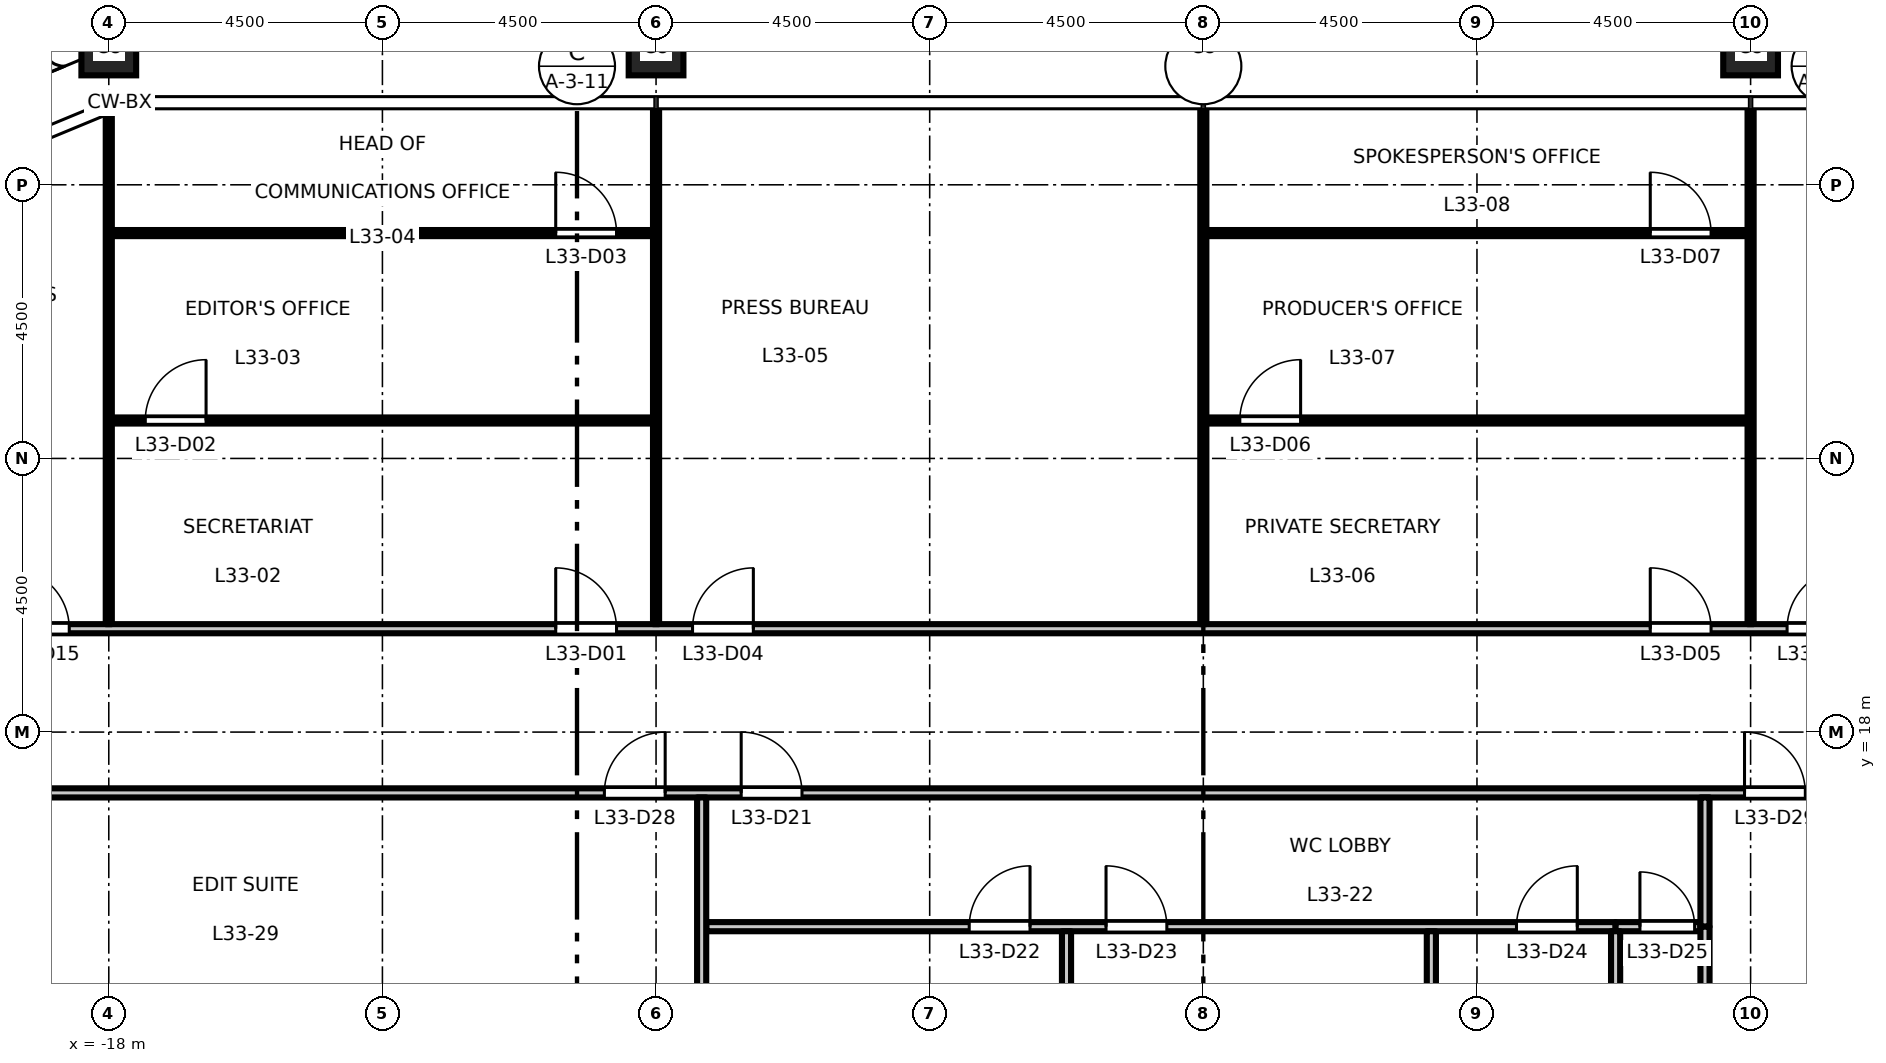
"""IFC4 building model, lengths in metres.
Left out: names, types, materials, properties, quantities, classifications, styles, units other than length and angle.
Written with IfcOpenShell. Run it as: python <this file> out.ifc"""

import sys

from ifc_helpers import new_model, si_unit, direction, frame, frame_2d, origin, origin_2d, place, context, subcontext, project, spatial, rectangle, hollow_rectangle, extrude, element, fill, save


model = new_model("IFC4")
c1 = context("Model", 3, precision=1e-05, world=origin(), true_north=direction((0.0, 1.0)))
c2 = subcontext(c1, "Body", "Model", "MODEL_VIEW")
j1 = project(units=[si_unit("LENGTHUNIT", "METRE"), si_unit("PLANEANGLEUNIT", "RADIAN")], contexts=[c1])
p1 = place(None, origin())
s1 = spatial("IfcSite", under=j1, at=p1, CompositionType="ELEMENT")
p2 = place(p1, origin())
s2 = spatial("IfcBuilding", under=s1, at=p2, CompositionType="ELEMENT")
p3 = place(p2, frame((0.0, 0.0, 154.2)))
s3 = spatial("IfcBuildingStorey", under=s2, at=p3, CompositionType="ELEMENT", Elevation=154.2)
for number, where, z_axis, x_axis in (
    (1, (9.0, 29.25, 0.0), (0.0, 0.0, 1.0), (1.0, 0.0, 0.0)),
    (2, (0.0, 29.25, 0.0), (0.0, 0.0, 1.0), (1.0, 0.0, 0.0)),
    (3, (-9.0, 29.25, 0.0), (0.0, 0.0, 1.0), (1.0, 0.0, 0.0)),
    (4, (-18.0, 29.25, 0.0), (0.0, 0.0, 1.0), (1.0, 0.0, 0.0)),
):
    element("IfcColumn", number, at=place(p3, frame(where, z_axis=z_axis, x_axis=x_axis)), inside=s3, PredefinedType="COLUMN", context=c2, shape_type="SweptSolid", body=[
        extrude(hollow_rectangle(XDim=0.9, YDim=0.9, WallThickness=0.05, at=origin_2d()), origin(), (0.0, 0.0, 1.0), 4.5),
    ])
p4 = place(p3, frame((-8.175, 14.8, 0.0), z_axis=(0.0, 0.0, 1.0), x_axis=(1.0, 0.0, 0.0)))
e5 = element("IfcWall", 5, at=p4, inside=s3, PredefinedType="PARTITIONING", context=c2, shape_type="SweptSolid", body=[
    extrude(rectangle(XDim=14.955, YDim=0.15, at=frame_2d((7.478, 0.0))), origin(), (0.0, 0.0, 1.0), 4.35),
])
p5 = place(p4, frame((4.325, 0.0, 0.0)))
e6 = element("IfcOpeningElement", 6, at=p5, cuts=e5, PredefinedType="OPENING", context=c2, shape_type="SweptSolid", body=[
    extrude(rectangle(XDim=1.0, YDim=2.1, at=frame_2d((0.5, 1.05))), frame((0.0, 0.085, 0.0), z_axis=(0.0, -1.0, 0.0), x_axis=(1.0, 0.0, 0.0)), (0.0, 0.0, 1.0), 0.17),
])
p6 = place(p4, frame((6.575, 0.0, 0.0)))
e7 = element("IfcOpeningElement", 7, at=p6, cuts=e5, PredefinedType="OPENING", context=c2, shape_type="SweptSolid", body=[
    extrude(rectangle(XDim=1.0, YDim=2.1, at=frame_2d((0.5, 1.05))), frame((0.0, 0.085, 0.0), z_axis=(0.0, -1.0, 0.0), x_axis=(1.0, 0.0, 0.0)), (0.0, 0.0, 1.0), 0.17),
])
p7 = place(p4, frame((13.325, 0.0, 0.0)))
e8 = element("IfcOpeningElement", 8, at=p7, cuts=e5, PredefinedType="OPENING", context=c2, shape_type="SweptSolid", body=[
    extrude(rectangle(XDim=1.0, YDim=2.1, at=frame_2d((0.5, 1.05))), frame((0.0, 0.085, 0.0), z_axis=(0.0, -1.0, 0.0), x_axis=(1.0, 0.0, 0.0)), (0.0, 0.0, 1.0), 0.17),
])
p8 = place(p3, frame((6.78, 14.8, 0.0), z_axis=(0.0, 0.0, 1.0), x_axis=(1.0, 0.0, 0.0)))
e9 = element("IfcWall", 9, at=p8, inside=s3, PredefinedType="PARTITIONING", context=c2, shape_type="SweptSolid", body=[
    extrude(rectangle(XDim=1.395, YDim=0.15, at=frame_2d((0.698, 0.0))), origin(), (0.0, 0.0, 1.0), 4.35),
])
p9 = place(p8, frame((0.4, 0.0, 0.0)))
e10 = element("IfcOpeningElement", 10, at=p9, cuts=e9, PredefinedType="OPENING", context=c2, shape_type="SweptSolid", body=[
    extrude(rectangle(XDim=0.9, YDim=2.1, at=frame_2d((0.45, 1.05))), frame((0.0, 0.085, 0.0), z_axis=(0.0, -1.0, 0.0), x_axis=(1.0, 0.0, 0.0)), (0.0, 0.0, 1.0), 0.17),
])
p10 = place(p3, frame((-21.825, 17.0, 0.0), z_axis=(0.0, 0.0, 1.0), x_axis=(1.0, 0.0, 0.0)))
e11 = element("IfcWall", 11, at=p10, inside=s3, PredefinedType="PARTITIONING", context=c2, shape_type="SweptSolid", body=[
    extrude(rectangle(XDim=43.65, YDim=0.15, at=frame_2d((21.825, 0.0))), origin(), (0.0, 0.0, 1.0), 4.35),
])
p11 = place(p10, frame((14.225, 0.0, 0.0)))
e12 = element("IfcOpeningElement", 12, at=p11, cuts=e11, PredefinedType="OPENING", context=c2, shape_type="SweptSolid", body=[
    extrude(rectangle(XDim=1.0, YDim=2.1, at=frame_2d((0.5, 1.05))), frame((0.0, 0.085, 0.0), z_axis=(0.0, -1.0, 0.0), x_axis=(1.0, 0.0, 0.0)), (0.0, 0.0, 1.0), 0.17),
])
p12 = place(p10, frame((11.975, 0.0, 0.0)))
e13 = element("IfcOpeningElement", 13, at=p12, cuts=e11, PredefinedType="OPENING", context=c2, shape_type="SweptSolid", body=[
    extrude(rectangle(XDim=1.0, YDim=2.1, at=frame_2d((0.5, 1.05))), frame((0.0, 0.085, 0.0), z_axis=(0.0, -1.0, 0.0), x_axis=(1.0, 0.0, 0.0)), (0.0, 0.0, 1.0), 0.17),
])
p13 = place(p10, frame((30.725, 0.0, 0.0)))
e14 = element("IfcOpeningElement", 14, at=p13, cuts=e11, PredefinedType="OPENING", context=c2, shape_type="SweptSolid", body=[
    extrude(rectangle(XDim=1.0, YDim=2.1, at=frame_2d((0.5, 1.05))), frame((0.0, 0.085, 0.0), z_axis=(0.0, -1.0, 0.0), x_axis=(1.0, 0.0, 0.0)), (0.0, 0.0, 1.0), 0.17),
])
p14 = place(p3, frame((-27.474, 19.7, 0.0), z_axis=(0.0, 0.0, 1.0), x_axis=(1.0, 0.0, 0.0)))
e15 = element("IfcWall", 15, at=p14, inside=s3, PredefinedType="PARTITIONING", context=c2, shape_type="SweptSolid", body=[
    extrude(rectangle(XDim=54.948, YDim=0.15, at=frame_2d((27.474, 0.0))), origin(), (0.0, 0.0, 1.0), 4.35),
])
p15 = place(p14, frame((16.824, 0.0, 0.0)))
e16 = element("IfcOpeningElement", 16, at=p15, cuts=e15, PredefinedType="OPENING", context=c2, shape_type="SweptSolid", body=[
    extrude(rectangle(XDim=1.0, YDim=2.1, at=frame_2d((0.5, 1.05))), frame((0.0, 0.085, 0.0), z_axis=(0.0, -1.0, 0.0), x_axis=(1.0, 0.0, 0.0)), (0.0, 0.0, 1.0), 0.17),
])
p16 = place(p14, frame((19.074, 0.0, 0.0)))
e17 = element("IfcOpeningElement", 17, at=p16, cuts=e15, PredefinedType="OPENING", context=c2, shape_type="SweptSolid", body=[
    extrude(rectangle(XDim=1.0, YDim=2.1, at=frame_2d((0.5, 1.05))), frame((0.0, 0.085, 0.0), z_axis=(0.0, -1.0, 0.0), x_axis=(1.0, 0.0, 0.0)), (0.0, 0.0, 1.0), 0.17),
])
p17 = place(p14, frame((34.824, 0.0, 0.0)))
e18 = element("IfcOpeningElement", 18, at=p17, cuts=e15, PredefinedType="OPENING", context=c2, shape_type="SweptSolid", body=[
    extrude(rectangle(XDim=1.0, YDim=2.1, at=frame_2d((0.5, 1.05))), frame((0.0, 0.085, 0.0), z_axis=(0.0, -1.0, 0.0), x_axis=(1.0, 0.0, 0.0)), (0.0, 0.0, 1.0), 0.17),
])
p18 = place(p14, frame((37.074, 0.0, 0.0)))
e19 = element("IfcOpeningElement", 19, at=p18, cuts=e15, PredefinedType="OPENING", context=c2, shape_type="SweptSolid", body=[
    extrude(rectangle(XDim=1.0, YDim=2.1, at=frame_2d((0.5, 1.05))), frame((0.0, 0.085, 0.0), z_axis=(0.0, -1.0, 0.0), x_axis=(1.0, 0.0, 0.0)), (0.0, 0.0, 1.0), 0.17),
])
p19 = place(p14, frame((7.824, 0.0, 0.0)))
e20 = element("IfcOpeningElement", 20, at=p19, cuts=e15, PredefinedType="OPENING", context=c2, shape_type="SweptSolid", body=[
    extrude(rectangle(XDim=1.0, YDim=2.1, at=frame_2d((0.5, 1.05))), frame((0.0, 0.085, 0.0), z_axis=(0.0, -1.0, 0.0), x_axis=(1.0, 0.0, 0.0)), (0.0, 0.0, 1.0), 0.17),
])
p20 = place(p14, frame((46.048, 0.0, 0.0)))
e21 = element("IfcOpeningElement", 21, at=p20, cuts=e15, PredefinedType="OPENING", context=c2, shape_type="SweptSolid", body=[
    extrude(rectangle(XDim=1.0, YDim=2.1, at=frame_2d((0.5, 1.05))), frame((0.0, 0.085, 0.0), z_axis=(0.0, -1.0, 0.0), x_axis=(1.0, 0.0, 0.0)), (0.0, 0.0, 1.0), 0.17),
])
p21 = place(p3, frame((-17.95, 23.124, 0.0), z_axis=(0.0, 0.0, 1.0), x_axis=(1.0, 0.0, 0.0)))
e22 = element("IfcWall", 22, at=p21, inside=s3, PredefinedType="PARTITIONING", context=c2, shape_type="SweptSolid", body=[
    extrude(rectangle(XDim=8.9, YDim=0.1, at=frame_2d((4.45, 0.0))), origin(), (0.0, 0.0, 1.0), 4.35),
])
p22 = place(p21, frame((0.55, 0.0, 0.0)))
e23 = element("IfcOpeningElement", 23, at=p22, cuts=e22, PredefinedType="OPENING", context=c2, shape_type="SweptSolid", body=[
    extrude(rectangle(XDim=1.0, YDim=2.1, at=frame_2d((0.5, 1.05))), frame((0.0, 0.06, 0.0), z_axis=(0.0, -1.0, 0.0), x_axis=(1.0, 0.0, 0.0)), (0.0, 0.0, 1.0), 0.12),
])
p23 = place(p3, frame((0.05, 23.124, 0.0), z_axis=(0.0, 0.0, 1.0), x_axis=(1.0, 0.0, 0.0)))
e24 = element("IfcWall", 24, at=p23, inside=s3, PredefinedType="PARTITIONING", context=c2, shape_type="SweptSolid", body=[
    extrude(rectangle(XDim=8.9, YDim=0.1, at=frame_2d((4.45, 0.0))), origin(), (0.0, 0.0, 1.0), 4.35),
])
p24 = place(p23, frame((0.55, 0.0, 0.0)))
e25 = element("IfcOpeningElement", 25, at=p24, cuts=e24, PredefinedType="OPENING", context=c2, shape_type="SweptSolid", body=[
    extrude(rectangle(XDim=1.0, YDim=2.1, at=frame_2d((0.5, 1.05))), frame((0.0, 0.06, 0.0), z_axis=(0.0, -1.0, 0.0), x_axis=(1.0, 0.0, 0.0)), (0.0, 0.0, 1.0), 0.12),
])
p25 = place(p3, frame((-17.95, 26.206, 0.0), z_axis=(0.0, 0.0, 1.0), x_axis=(1.0, 0.0, 0.0)))
e26 = element("IfcWall", 26, at=p25, inside=s3, PredefinedType="PARTITIONING", context=c2, shape_type="SweptSolid", body=[
    extrude(rectangle(XDim=8.9, YDim=0.1, at=frame_2d((4.45, 0.0))), origin(), (0.0, 0.0, 1.0), 4.35),
])
p26 = place(p25, frame((7.3, 0.0, 0.0)))
e27 = element("IfcOpeningElement", 27, at=p26, cuts=e26, PredefinedType="OPENING", context=c2, shape_type="SweptSolid", body=[
    extrude(rectangle(XDim=1.0, YDim=2.1, at=frame_2d((0.5, 1.05))), frame((0.0, 0.06, 0.0), z_axis=(0.0, -1.0, 0.0), x_axis=(1.0, 0.0, 0.0)), (0.0, 0.0, 1.0), 0.12),
])
p27 = place(p3, frame((0.05, 26.206, 0.0), z_axis=(0.0, 0.0, 1.0), x_axis=(1.0, 0.0, 0.0)))
e28 = element("IfcWall", 28, at=p27, inside=s3, PredefinedType="PARTITIONING", context=c2, shape_type="SweptSolid", body=[
    extrude(rectangle(XDim=8.9, YDim=0.1, at=frame_2d((4.45, 0.0))), origin(), (0.0, 0.0, 1.0), 4.35),
])
p28 = place(p27, frame((7.3, 0.0, 0.0)))
e29 = element("IfcOpeningElement", 29, at=p28, cuts=e28, PredefinedType="OPENING", context=c2, shape_type="SweptSolid", body=[
    extrude(rectangle(XDim=1.0, YDim=2.1, at=frame_2d((0.5, 1.05))), frame((0.0, 0.06, 0.0), z_axis=(0.0, -1.0, 0.0), x_axis=(1.0, 0.0, 0.0)), (0.0, 0.0, 1.0), 0.12),
])
p29 = place(p3, frame((-18.0, 19.775, 0.0), z_axis=(0.0, 0.0, 1.0), x_axis=(0.0, 1.0, 0.0)))
e30 = element("IfcWall", 30, at=p29, inside=s3, PredefinedType="PARTITIONING", context=c2, shape_type="SweptSolid", body=[
    extrude(rectangle(XDim=8.403, YDim=0.1, at=frame_2d((4.202, 0.0))), origin(), (0.0, 0.0, 1.0), 3.45),
])
p30 = place(p3, frame((-9.0, 19.775, 0.0), z_axis=(0.0, 0.0, 1.0), x_axis=(0.0, 1.0, 0.0)))
e31 = element("IfcWall", 31, at=p30, inside=s3, PredefinedType="PARTITIONING", context=c2, shape_type="SweptSolid", body=[
    extrude(rectangle(XDim=8.485, YDim=0.1, at=frame_2d((4.243, 0.0))), origin(), (0.0, 0.0, 1.0), 3.45),
])
p31 = place(p3, frame((-8.25, 13.5, 0.0), z_axis=(0.0, 0.0, 1.0), x_axis=(0.0, 1.0, 0.0)))
e32 = element("IfcWall", 32, at=p31, inside=s3, PredefinedType="PARTITIONING", context=c2, shape_type="SweptSolid", body=[
    extrude(rectangle(XDim=3.425, YDim=0.15, at=frame_2d((1.712, 0.0))), origin(), (0.0, 0.0, 1.0), 4.35),
])
p32 = place(p3, frame((-2.25, 8.37, 0.0), z_axis=(0.0, 0.0, 1.0), x_axis=(0.0, 1.0, 0.0)))
e33 = element("IfcWall", 33, at=p32, inside=s3, PredefinedType="PARTITIONING", context=c2, shape_type="SweptSolid", body=[
    extrude(rectangle(XDim=6.355, YDim=0.15, at=frame_2d((3.177, 0.0))), origin(), (0.0, 0.0, 1.0), 4.35),
])
p33 = place(p3, frame((0.0, 19.775, 0.0), z_axis=(0.0, 0.0, 1.0), x_axis=(0.0, 1.0, 0.0)))
e34 = element("IfcWall", 34, at=p33, inside=s3, PredefinedType="PARTITIONING", context=c2, shape_type="SweptSolid", body=[
    extrude(rectangle(XDim=8.485, YDim=0.1, at=frame_2d((4.243, 0.0))), origin(), (0.0, 0.0, 1.0), 3.45),
])
p34 = place(p3, frame((3.75, 8.37, 0.0), z_axis=(0.0, 0.0, 1.0), x_axis=(0.0, 1.0, 0.0)))
e35 = element("IfcWall", 35, at=p34, inside=s3, PredefinedType="PARTITIONING", context=c2, shape_type="SweptSolid", body=[
    extrude(rectangle(XDim=6.355, YDim=0.15, at=frame_2d((3.177, 0.0))), origin(), (0.0, 0.0, 1.0), 4.35),
])
p35 = place(p3, frame((6.78, 8.087, 0.0), z_axis=(0.0, 0.0, 1.0), x_axis=(0.0, 1.0, 0.0)))
e36 = element("IfcWall", 36, at=p35, inside=s3, PredefinedType="PARTITIONING", context=c2, shape_type="SweptSolid", body=[
    extrude(rectangle(XDim=6.638, YDim=0.15, at=frame_2d((3.319, 0.0))), origin(), (0.0, 0.0, 1.0), 4.35),
])
p36 = place(p3, frame((8.25, 14.8, 0.0), z_axis=(0.0, 0.0, 1.0), x_axis=(0.0, 1.0, 0.0)))
e37 = element("IfcWall", 37, at=p36, inside=s3, PredefinedType="PARTITIONING", context=c2, shape_type="SweptSolid", body=[
    extrude(rectangle(XDim=2.125, YDim=0.15, at=frame_2d((1.062, 0.0))), origin(), (0.0, 0.0, 1.0), 4.35),
])
p37 = place(p3, frame((8.25, 13.5, 0.0), z_axis=(0.0, 0.0, 1.0), x_axis=(0.0, 1.0, 0.0)))
e38 = element("IfcWall", 38, at=p37, inside=s3, PredefinedType="PARTITIONING", context=c2, shape_type="SweptSolid", body=[
    extrude(rectangle(XDim=1.3, YDim=0.15, at=frame_2d((0.65, 0.0))), origin(), (0.0, 0.0, 1.0), 4.35),
])
p38 = place(p3, frame((9.0, 19.775, 0.0), z_axis=(0.0, 0.0, 1.0), x_axis=(0.0, 1.0, 0.0)))
e39 = element("IfcWall", 39, at=p38, inside=s3, PredefinedType="PARTITIONING", context=c2, shape_type="SweptSolid", body=[
    extrude(rectangle(XDim=8.485, YDim=0.1, at=frame_2d((4.243, 0.0))), origin(), (0.0, 0.0, 1.0), 3.45),
])
p39 = place(p15, origin())
e40 = element("IfcDoor", 40, at=p39, inside=s3, OperationType="SINGLE_SWING_LEFT", PredefinedType="DOOR", context=c2, shape_type="SweptSolid", body=[
    extrude(rectangle(XDim=1.0, YDim=2.1, at=frame_2d((0.5, 1.05))), frame((0.0, 0.025, 0.0), z_axis=(0.0, -1.0, 0.0), x_axis=(1.0, 0.0, 0.0)), (0.0, 0.0, 1.0), 0.05),
])
fill(e16, e40)
p40 = place(p22, origin())
e41 = element("IfcDoor", 41, at=p40, inside=s3, OperationType="SINGLE_SWING_RIGHT", PredefinedType="DOOR", context=c2, shape_type="SweptSolid", body=[
    extrude(rectangle(XDim=1.0, YDim=2.1, at=frame_2d((0.5, 1.05))), frame((0.0, 0.025, 0.0), z_axis=(0.0, -1.0, 0.0), x_axis=(1.0, 0.0, 0.0)), (0.0, 0.0, 1.0), 0.05),
])
fill(e23, e41)
p41 = place(p26, origin())
e42 = element("IfcDoor", 42, at=p41, inside=s3, OperationType="SINGLE_SWING_LEFT", PredefinedType="DOOR", context=c2, shape_type="SweptSolid", body=[
    extrude(rectangle(XDim=1.0, YDim=2.1, at=frame_2d((0.5, 1.05))), frame((0.0, 0.025, 0.0), z_axis=(0.0, -1.0, 0.0), x_axis=(1.0, 0.0, 0.0)), (0.0, 0.0, 1.0), 0.05),
])
fill(e27, e42)
p42 = place(p16, origin())
e43 = element("IfcDoor", 43, at=p42, inside=s3, OperationType="SINGLE_SWING_RIGHT", PredefinedType="DOOR", context=c2, shape_type="SweptSolid", body=[
    extrude(rectangle(XDim=1.0, YDim=2.1, at=frame_2d((0.5, 1.05))), frame((0.0, 0.025, 0.0), z_axis=(0.0, -1.0, 0.0), x_axis=(1.0, 0.0, 0.0)), (0.0, 0.0, 1.0), 0.05),
])
fill(e17, e43)
p43 = place(p17, origin())
e44 = element("IfcDoor", 44, at=p43, inside=s3, OperationType="SINGLE_SWING_LEFT", PredefinedType="DOOR", context=c2, shape_type="SweptSolid", body=[
    extrude(rectangle(XDim=1.0, YDim=2.1, at=frame_2d((0.5, 1.05))), frame((0.0, 0.025, 0.0), z_axis=(0.0, -1.0, 0.0), x_axis=(1.0, 0.0, 0.0)), (0.0, 0.0, 1.0), 0.05),
])
fill(e18, e44)
p44 = place(p24, origin())
e45 = element("IfcDoor", 45, at=p44, inside=s3, OperationType="SINGLE_SWING_RIGHT", PredefinedType="DOOR", context=c2, shape_type="SweptSolid", body=[
    extrude(rectangle(XDim=1.0, YDim=2.1, at=frame_2d((0.5, 1.05))), frame((0.0, 0.025, 0.0), z_axis=(0.0, -1.0, 0.0), x_axis=(1.0, 0.0, 0.0)), (0.0, 0.0, 1.0), 0.05),
])
fill(e25, e45)
p45 = place(p28, origin())
e46 = element("IfcDoor", 46, at=p45, inside=s3, OperationType="SINGLE_SWING_LEFT", PredefinedType="DOOR", context=c2, shape_type="SweptSolid", body=[
    extrude(rectangle(XDim=1.0, YDim=2.1, at=frame_2d((0.5, 1.05))), frame((0.0, 0.025, 0.0), z_axis=(0.0, -1.0, 0.0), x_axis=(1.0, 0.0, 0.0)), (0.0, 0.0, 1.0), 0.05),
])
fill(e29, e46)
p46 = place(p18, origin())
e47 = element("IfcDoor", 47, at=p46, inside=s3, OperationType="SINGLE_SWING_RIGHT", PredefinedType="DOOR", context=c2, shape_type="SweptSolid", body=[
    extrude(rectangle(XDim=1.0, YDim=2.1, at=frame_2d((0.5, 1.05))), frame((0.0, 0.025, 0.0), z_axis=(0.0, -1.0, 0.0), x_axis=(1.0, 0.0, 0.0)), (0.0, 0.0, 1.0), 0.05),
])
fill(e19, e47)
p47 = place(p19, origin())
e48 = element("IfcDoor", 48, at=p47, inside=s3, OperationType="SINGLE_SWING_LEFT", PredefinedType="DOOR", context=c2, shape_type="SweptSolid", body=[
    extrude(rectangle(XDim=1.0, YDim=2.1, at=frame_2d((0.5, 1.05))), frame((0.0, 0.025, 0.0), z_axis=(0.0, -1.0, 0.0), x_axis=(1.0, 0.0, 0.0)), (0.0, 0.0, 1.0), 0.05),
])
fill(e20, e48)
p48 = place(p11, origin())
e49 = element("IfcDoor", 49, at=p48, inside=s3, OperationType="SINGLE_SWING_LEFT", PredefinedType="DOOR", context=c2, shape_type="SweptSolid", body=[
    extrude(rectangle(XDim=1.0, YDim=2.1, at=frame_2d((0.5, 1.05))), frame((0.0, 0.025, 0.0), z_axis=(0.0, -1.0, 0.0), x_axis=(1.0, 0.0, 0.0)), (0.0, 0.0, 1.0), 0.05),
])
fill(e12, e49)
p49 = place(p5, origin())
e50 = element("IfcDoor", 50, at=p49, inside=s3, OperationType="SINGLE_SWING_RIGHT", PredefinedType="DOOR", context=c2, shape_type="SweptSolid", body=[
    extrude(rectangle(XDim=1.0, YDim=2.1, at=frame_2d((0.5, 1.05))), frame((0.0, 0.025, 0.0), z_axis=(0.0, -1.0, 0.0), x_axis=(1.0, 0.0, 0.0)), (0.0, 0.0, 1.0), 0.05),
])
fill(e6, e50)
p50 = place(p6, origin())
e51 = element("IfcDoor", 51, at=p50, inside=s3, OperationType="SINGLE_SWING_LEFT", PredefinedType="DOOR", context=c2, shape_type="SweptSolid", body=[
    extrude(rectangle(XDim=1.0, YDim=2.1, at=frame_2d((0.5, 1.05))), frame((0.0, 0.025, 0.0), z_axis=(0.0, -1.0, 0.0), x_axis=(1.0, 0.0, 0.0)), (0.0, 0.0, 1.0), 0.05),
])
fill(e7, e51)
p51 = place(p7, origin())
e52 = element("IfcDoor", 52, at=p51, inside=s3, OperationType="SINGLE_SWING_RIGHT", PredefinedType="DOOR", context=c2, shape_type="SweptSolid", body=[
    extrude(rectangle(XDim=1.0, YDim=2.1, at=frame_2d((0.5, 1.05))), frame((0.0, 0.025, 0.0), z_axis=(0.0, -1.0, 0.0), x_axis=(1.0, 0.0, 0.0)), (0.0, 0.0, 1.0), 0.05),
])
fill(e8, e52)
p52 = place(p9, origin())
e53 = element("IfcDoor", 53, at=p52, inside=s3, OperationType="SINGLE_SWING_LEFT", PredefinedType="DOOR", context=c2, shape_type="SweptSolid", body=[
    extrude(rectangle(XDim=0.9, YDim=2.1, at=frame_2d((0.45, 1.05))), frame((0.0, 0.025, 0.0), z_axis=(0.0, -1.0, 0.0), x_axis=(1.0, 0.0, 0.0)), (0.0, 0.0, 1.0), 0.05),
])
fill(e10, e53)
p53 = place(p12, origin())
e54 = element("IfcDoor", 54, at=p53, inside=s3, OperationType="SINGLE_SWING_RIGHT", PredefinedType="DOOR", context=c2, shape_type="SweptSolid", body=[
    extrude(rectangle(XDim=1.0, YDim=2.1, at=frame_2d((0.5, 1.05))), frame((0.0, 0.025, 0.0), z_axis=(0.0, -1.0, 0.0), x_axis=(1.0, 0.0, 0.0)), (0.0, 0.0, 1.0), 0.05),
])
fill(e13, e54)
p54 = place(p13, origin())
e55 = element("IfcDoor", 55, at=p54, inside=s3, OperationType="SINGLE_SWING_LEFT", PredefinedType="DOOR", context=c2, shape_type="SweptSolid", body=[
    extrude(rectangle(XDim=1.0, YDim=2.1, at=frame_2d((0.5, 1.05))), frame((0.0, 0.025, 0.0), z_axis=(0.0, -1.0, 0.0), x_axis=(1.0, 0.0, 0.0)), (0.0, 0.0, 1.0), 0.05),
])
fill(e14, e55)
save(model, sys.argv[1])
